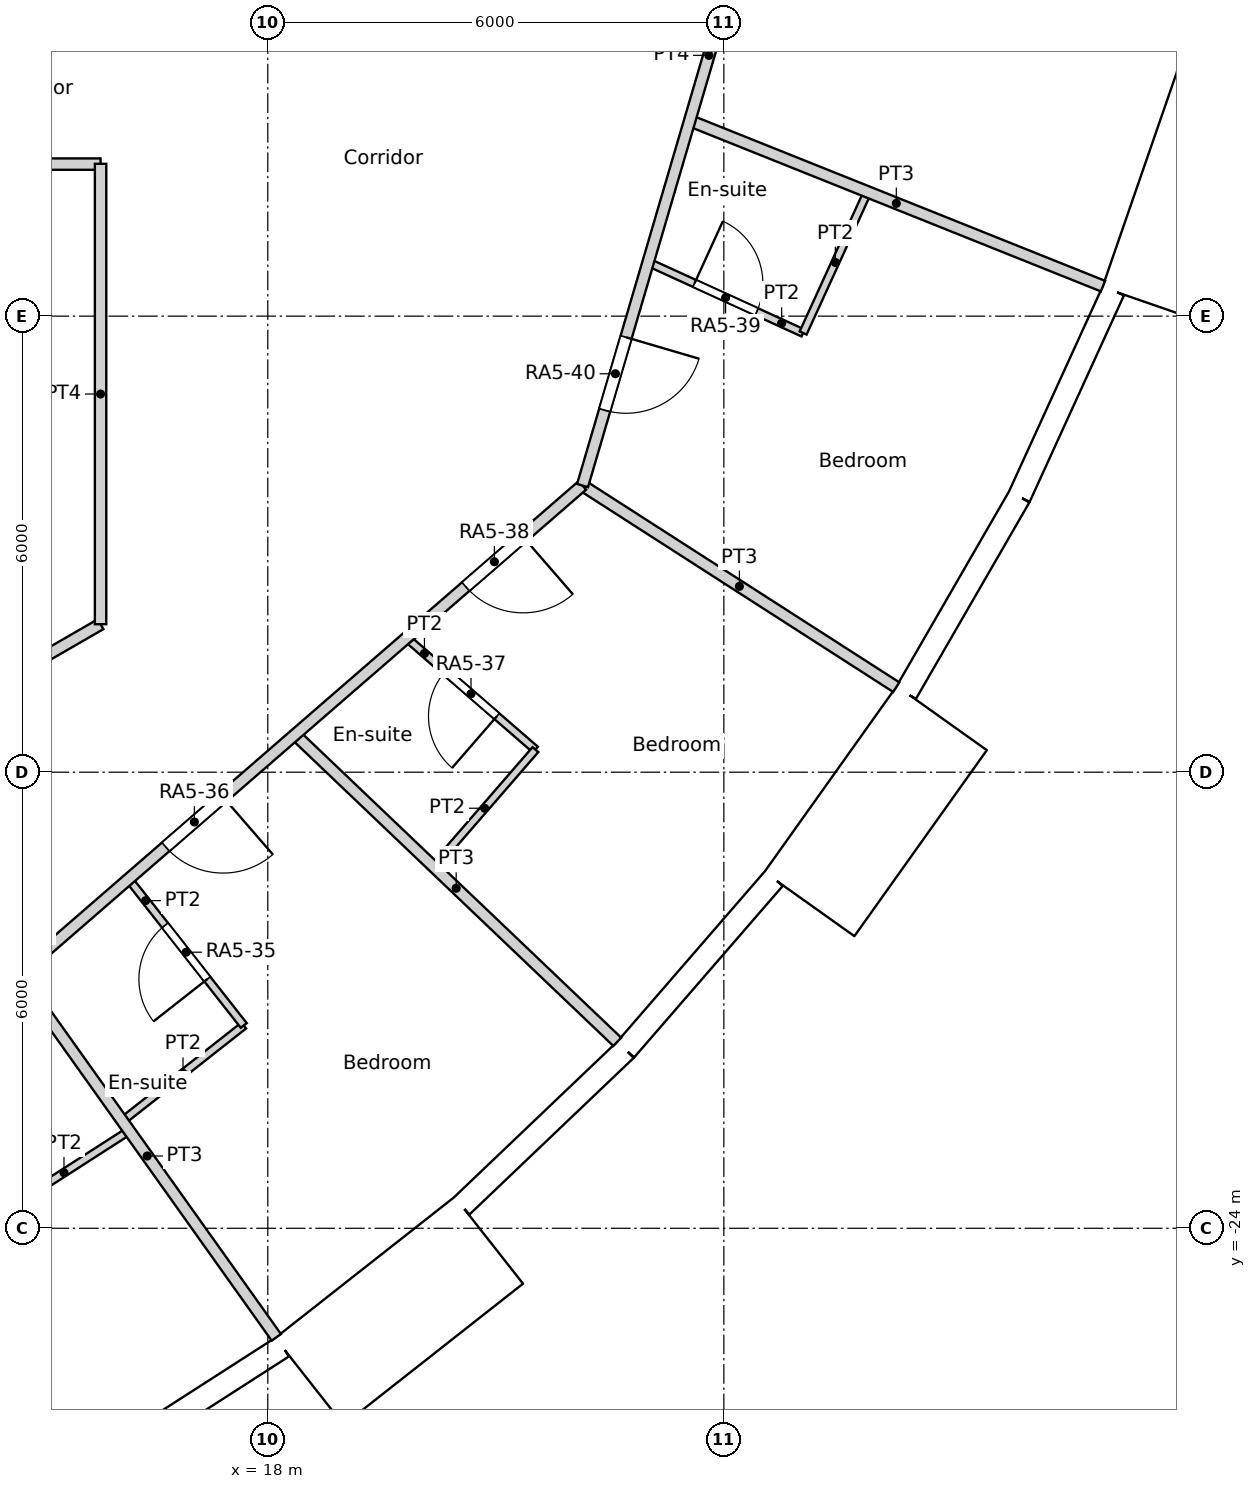
"""IFC4 building model, lengths in metres.
Left out: names, types, materials, properties, quantities, classifications, styles, units other than length and angle.
Written with IfcOpenShell. Run it as: python <this file> out.ifc"""

import sys

from ifc_helpers import new_model, si_unit, direction, frame, frame_2d, origin, origin_2d, place, context, subcontext, project, spatial, rectangle, circle, extrude, element, fill, save


model = new_model("IFC4")
c1 = context("Model", 3, precision=1e-05, world=origin(), true_north=direction((0.0, 1.0)))
c2 = subcontext(c1, "Body", "Model", "MODEL_VIEW")
j1 = project(units=[si_unit("LENGTHUNIT", "METRE"), si_unit("PLANEANGLEUNIT", "RADIAN")], contexts=[c1])
p1 = place(None, origin())
s1 = spatial("IfcSite", under=j1, at=p1, CompositionType="ELEMENT")
p2 = place(p1, origin())
s2 = spatial("IfcBuilding", under=s1, at=p2, CompositionType="ELEMENT")
p3 = place(p2, frame((0.0, 0.0, 71.4)))
s3 = spatial("IfcBuildingStorey", under=s2, at=p3, CompositionType="ELEMENT", Elevation=71.4)
for number, where, z_axis, x_axis in (
    (1, (17.561, -24.661, 0.0), (0.0, 0.0, 1.0), (1.0, 0.0, 0.0)),
    (2, (21.911, -20.892, 0.0), (0.0, 0.0, 1.0), (1.0, 0.0, 0.0)),
    (3, (25.469, -16.368, 0.0), (0.0, 0.0, 1.0), (1.0, 0.0, 0.0)),
    (4, (28.106, -11.252, 0.0), (0.0, 0.0, 1.0), (1.0, 0.0, 0.0)),
):
    element("IfcColumn", number, at=place(p3, frame(where, z_axis=z_axis, x_axis=x_axis)), inside=s3, PredefinedType="COLUMN", context=c2, shape_type="SweptSolid", body=[
        extrude(circle(Radius=0.6, at=origin_2d()), origin(), (0.0, 0.0, 1.0), 3.6),
    ])
for number, where, z_axis, x_axis in (
    (5, (14.659, -19.69, 0.0), (0.0, 0.0, 1.0), (1.0, 0.0, 0.0)),
    (6, (18.805, -15.779, 0.0), (0.0, 0.0, 1.0), (1.0, 0.0, 0.0)),
    (7, (21.937, -11.017, 0.0), (0.0, 0.0, 1.0), (1.0, 0.0, 0.0)),
):
    element("IfcColumn", number, at=place(p3, frame(where, z_axis=z_axis, x_axis=x_axis)), inside=s3, PredefinedType="COLUMN", context=c2, shape_type="SweptSolid", body=[
        extrude(circle(Radius=0.65, at=origin_2d()), origin(), (0.0, 0.0, 1.0), 3.6),
    ])
p4 = place(p3, frame((15.552, -10.603, 0.0), z_axis=(0.0, 0.0, 1.0), x_axis=(1.0, 0.0, 0.0)))
e8 = element("IfcColumn", 8, at=p4, inside=s3, PredefinedType="COLUMN", context=c2, shape_type="SweptSolid", body=[
    extrude(circle(Radius=0.7, at=origin_2d()), origin(), (0.0, 0.0, 1.0), 3.6),
])
p5 = place(p3, frame((15.687, -27.171, 0.0), z_axis=(0.0, 0.0, 1.0), x_axis=(0.84122372879, 0.540687190639, 0.0)))
e9 = element("IfcWall", 9, at=p5, inside=s3, PredefinedType="SOLIDWALL", context=c2, shape_type="SweptSolid", body=[
    extrude(rectangle(XDim=2.98, YDim=0.3, at=frame_2d((1.49, 0.0))), origin(), (0.0, 0.0, 1.0), 3.15),
])
p6 = place(p5, frame((1.49, 0.0, 1.55)))
e10 = element("IfcOpeningElement", 10, at=p6, cuts=e9, PredefinedType="OPENING", context=c2, shape_type="SweptSolid", body=[
    extrude(circle(Radius=0.9, at=origin_2d()), frame((0.0, 0.16, 0.0), z_axis=(0.0, -1.0, 0.0), x_axis=(1.0, 0.0, 0.0)), (0.0, 0.0, 1.0), 0.32),
])
p7 = place(p3, frame((18.549, -26.013, -0.45), z_axis=(0.0, 0.0, 1.0), x_axis=(0.786049992888, 0.618162930529, 0.0)))
e11 = element("IfcWall", 11, at=p7, inside=s3, PredefinedType="ELEMENTEDWALL", context=c2, shape_type="SweptSolid", body=[
    extrude(rectangle(XDim=3.0, YDim=1.45, at=frame_2d((1.5, 0.0))), origin(), (0.0, 0.0, 1.0), 3.6),
])
p8 = place(p7, frame((1.5, 0.0, 2.0)))
e12 = element("IfcOpeningElement", 12, at=p8, cuts=e11, PredefinedType="OPENING", context=c2, shape_type="SweptSolid", body=[
    extrude(circle(Radius=0.9, at=origin_2d()), frame((0.0, 0.735, 0.0), z_axis=(0.0, -1.0, 0.0), x_axis=(1.0, 0.0, 0.0)), (0.0, 0.0, 1.0), 1.47),
])
p9 = place(p3, frame((20.55, -23.707, 0.0), z_axis=(0.0, 0.0, 1.0), x_axis=(0.723744206617, 0.690068346896, 0.0)))
e13 = element("IfcWall", 13, at=p9, inside=s3, PredefinedType="SOLIDWALL", context=c2, shape_type="SweptSolid", body=[
    extrude(rectangle(XDim=2.98, YDim=0.3, at=frame_2d((1.49, 0.0))), origin(), (0.0, 0.0, 1.0), 3.15),
])
p10 = place(p9, frame((1.49, 0.0, 1.55)))
e14 = element("IfcOpeningElement", 14, at=p10, cuts=e13, PredefinedType="OPENING", context=c2, shape_type="SweptSolid", body=[
    extrude(circle(Radius=0.9, at=origin_2d()), frame((0.0, 0.16, 0.0), z_axis=(0.0, -1.0, 0.0), x_axis=(1.0, 0.0, 0.0)), (0.0, 0.0, 1.0), 0.32),
])
p11 = place(p3, frame((22.707, -21.651, 0.0), z_axis=(0.0, 0.0, 1.0), x_axis=(0.654830712471, 0.755775587066, 0.0)))
e15 = element("IfcWall", 15, at=p11, inside=s3, PredefinedType="SOLIDWALL", context=c2, shape_type="SweptSolid", body=[
    extrude(rectangle(XDim=2.98, YDim=0.3, at=frame_2d((1.49, 0.0))), origin(), (0.0, 0.0, 1.0), 3.15),
])
p12 = place(p11, frame((1.49, 0.0, 1.55)))
e16 = element("IfcOpeningElement", 16, at=p12, cuts=e15, PredefinedType="OPENING", context=c2, shape_type="SweptSolid", body=[
    extrude(circle(Radius=0.9, at=origin_2d()), frame((0.0, 0.16, 0.0), z_axis=(0.0, -1.0, 0.0), x_axis=(1.0, 0.0, 0.0)), (0.0, 0.0, 1.0), 0.32),
])
p13 = place(p3, frame((25.126, -19.734, -0.45), z_axis=(0.0, 0.0, 1.0), x_axis=(0.580090570606, 0.814551981088, 0.0)))
e17 = element("IfcWall", 17, at=p13, inside=s3, PredefinedType="ELEMENTEDWALL", context=c2, shape_type="SweptSolid", body=[
    extrude(rectangle(XDim=3.0, YDim=1.45, at=frame_2d((1.5, 0.0))), origin(), (0.0, 0.0, 1.0), 3.6),
])
p14 = place(p13, frame((1.5, 0.0, 2.0)))
e18 = element("IfcOpeningElement", 18, at=p14, cuts=e17, PredefinedType="OPENING", context=c2, shape_type="SweptSolid", body=[
    extrude(circle(Radius=0.9, at=origin_2d()), frame((0.0, 0.735, 0.0), z_axis=(0.0, -1.0, 0.0), x_axis=(1.0, 0.0, 0.0)), (0.0, 0.0, 1.0), 1.47),
])
p15 = place(p3, frame((26.397, -16.957, 0.0), z_axis=(0.0, 0.0, 1.0), x_axis=(0.499999078476, 0.866025935826, 0.0)))
e19 = element("IfcWall", 19, at=p15, inside=s3, PredefinedType="SOLIDWALL", context=c2, shape_type="SweptSolid", body=[
    extrude(rectangle(XDim=2.979, YDim=0.3, at=frame_2d((1.49, 0.0))), origin(), (0.0, 0.0, 1.0), 3.15),
])
p16 = place(p15, frame((1.49, 0.0, 1.55)))
e20 = element("IfcOpeningElement", 20, at=p16, cuts=e19, PredefinedType="OPENING", context=c2, shape_type="SweptSolid", body=[
    extrude(circle(Radius=0.9, at=origin_2d()), frame((0.0, 0.16, 0.0), z_axis=(0.0, -1.0, 0.0), x_axis=(1.0, 0.0, 0.0)), (0.0, 0.0, 1.0), 0.32),
])
p17 = place(p3, frame((27.887, -14.377, 0.0), z_axis=(0.0, 0.0, 1.0), x_axis=(0.415407317162, 0.909635509888, 0.0)))
e21 = element("IfcWall", 21, at=p17, inside=s3, PredefinedType="SOLIDWALL", context=c2, shape_type="SweptSolid", body=[
    extrude(rectangle(XDim=2.98, YDim=0.3, at=frame_2d((1.49, 0.0))), origin(), (0.0, 0.0, 1.0), 3.15),
])
p18 = place(p17, frame((1.49, 0.0, 1.55)))
e22 = element("IfcOpeningElement", 22, at=p18, cuts=e21, PredefinedType="OPENING", context=c2, shape_type="SweptSolid", body=[
    extrude(circle(Radius=0.9, at=origin_2d()), frame((0.0, 0.16, 0.0), z_axis=(0.0, -1.0, 0.0), x_axis=(1.0, 0.0, 0.0)), (0.0, 0.0, 1.0), 0.32),
])
p19 = place(p3, frame((29.668, -11.855, -0.45), z_axis=(0.0, 0.0, 1.0), x_axis=(0.327071431777, 0.944999618262, 0.0)))
e23 = element("IfcWall", 23, at=p19, inside=s3, PredefinedType="ELEMENTEDWALL", context=c2, shape_type="SweptSolid", body=[
    extrude(rectangle(XDim=3.0, YDim=1.45, at=frame_2d((1.5, 0.0))), origin(), (0.0, 0.0, 1.0), 3.6),
])
p20 = place(p19, frame((1.5, 0.0, 2.0)))
e24 = element("IfcOpeningElement", 24, at=p20, cuts=e23, PredefinedType="OPENING", context=c2, shape_type="SweptSolid", body=[
    extrude(circle(Radius=0.9, at=origin_2d()), frame((0.0, 0.735, 0.0), z_axis=(0.0, -1.0, 0.0), x_axis=(1.0, 0.0, 0.0)), (0.0, 0.0, 1.0), 1.47),
])
p21 = place(p3, frame((14.0, -10.0, 0.0), z_axis=(0.0, 0.0, 1.0), x_axis=(1.0, 0.0, 0.0)))
e25 = element("IfcWall", 25, at=p21, inside=s3, PredefinedType="PARTITIONING", context=c2, shape_type="SweptSolid", body=[
    extrude(rectangle(XDim=1.8, YDim=0.15, at=frame_2d((0.9, 0.0))), origin(), (0.0, 0.0, 1.0), 3.15),
])
p22 = place(p3, frame((15.8, -16.053, 0.0), z_axis=(0.0, 0.0, 1.0), x_axis=(0.0, 1.0, 0.0)))
e26 = element("IfcWall", 26, at=p22, inside=s3, PredefinedType="PARTITIONING", context=c2, shape_type="SweptSolid", body=[
    extrude(rectangle(XDim=6.057, YDim=0.15, at=frame_2d((3.028, 0.0))), origin(), (0.0, 0.0, 1.0), 3.15),
])
p23 = place(p3, frame((13.247, -21.939, 0.0), z_axis=(0.0, 0.0, 1.0), x_axis=(0.755420750547, 0.655240024451, 0.0)))
e27 = element("IfcWall", 27, at=p23, inside=s3, PredefinedType="PARTITIONING", context=c2, shape_type="SweptSolid", body=[
    extrude(rectangle(XDim=11.771, YDim=0.15, at=frame_2d((5.885, 0.0))), origin(), (0.0, 0.0, 1.0), 3.15),
])
p24 = place(p23, frame((4.513, 0.0, 0.0)))
e28 = element("IfcOpeningElement", 28, at=p24, cuts=e27, PredefinedType="OPENING", context=c2, shape_type="SweptSolid", body=[
    extrude(rectangle(XDim=1.0, YDim=2.1, at=frame_2d((0.5, 1.05))), frame((0.0, 0.075, 0.0), z_axis=(0.0, -1.0, 0.0), x_axis=(1.0, 0.0, 0.0)), (0.0, 0.0, 1.0), 0.15),
])
p25 = place(p23, frame((9.738, 0.0, 0.0)))
e29 = element("IfcOpeningElement", 29, at=p25, cuts=e27, PredefinedType="OPENING", context=c2, shape_type="SweptSolid", body=[
    extrude(rectangle(XDim=1.0, YDim=2.1, at=frame_2d((0.5, 1.05))), frame((0.0, 0.075, 0.0), z_axis=(0.0, -1.0, 0.0), x_axis=(1.0, 0.0, 0.0)), (0.0, 0.0, 1.0), 0.15),
])
p26 = place(p3, frame((22.141, -14.229, 0.0), z_axis=(0.0, 0.0, 1.0), x_axis=(0.281765208947, 0.959483385488, 0.0)))
e30 = element("IfcWall", 30, at=p26, inside=s3, PredefinedType="PARTITIONING", context=c2, shape_type="SweptSolid", body=[
    extrude(rectangle(XDim=14.83, YDim=0.15, at=frame_2d((7.415, 0.0))), origin(), (0.0, 0.0, 1.0), 3.15),
])
p27 = place(p26, frame((1.033, 0.0, 0.0)))
e31 = element("IfcOpeningElement", 31, at=p27, cuts=e30, PredefinedType="OPENING", context=c2, shape_type="SweptSolid", body=[
    extrude(rectangle(XDim=1.0, YDim=2.1, at=frame_2d((0.5, 1.05))), frame((0.0, 0.075, 0.0), z_axis=(0.0, -1.0, 0.0), x_axis=(1.0, 0.0, 0.0)), (0.0, 0.0, 1.0), 0.15),
])
p28 = place(p26, frame((9.765, 0.0, 0.0)))
e32 = element("IfcOpeningElement", 32, at=p28, cuts=e30, PredefinedType="OPENING", context=c2, shape_type="SweptSolid", body=[
    extrude(rectangle(XDim=1.8, YDim=2.1, at=frame_2d((0.9, 1.05))), frame((0.0, 0.075, 0.0), z_axis=(0.0, -1.0, 0.0), x_axis=(1.0, 0.0, 0.0)), (0.0, 0.0, 1.0), 0.15),
])
p29 = place(p3, frame((11.336, -18.63, 0.0), z_axis=(0.0, 0.0, 1.0), x_axis=(0.866063337164, 0.499934291702, 0.0)))
e33 = element("IfcWall", 33, at=p29, inside=s3, PredefinedType="PARTITIONING", context=c2, shape_type="SweptSolid", body=[
    extrude(rectangle(XDim=5.155, YDim=0.15, at=frame_2d((2.577, 0.0))), origin(), (0.0, 0.0, 1.0), 3.15),
])
p30 = place(p3, frame((14.46, -23.821, 0.0), z_axis=(0.0, 0.0, 1.0), x_axis=(0.841135728185, 0.540824081168, 0.0)))
e34 = element("IfcWall", 34, at=p30, inside=s3, PredefinedType="PARTITIONING", context=c2, shape_type="SweptSolid", body=[
    extrude(rectangle(XDim=2.041, YDim=0.1, at=frame_2d((1.021, 0.0))), origin(), (0.0, 0.0, 1.0), 3.15),
])
p31 = place(p3, frame((14.715, -20.664, 0.0), z_axis=(0.0, 0.0, 1.0), x_axis=(0.57995989616, -0.814645026282, 0.0)))
e35 = element("IfcWall", 35, at=p31, inside=s3, PredefinedType="PARTITIONING", context=c2, shape_type="SweptSolid", body=[
    extrude(rectangle(XDim=5.857, YDim=0.15, at=frame_2d((2.928, 0.0))), origin(), (0.0, 0.0, 1.0), 3.15),
])
p32 = place(p3, frame((16.086, -22.589, 0.0), z_axis=(0.0, 0.0, 1.0), x_axis=(0.785984904201, 0.618245687707, 0.0)))
e36 = element("IfcWall", 36, at=p32, inside=s3, PredefinedType="PARTITIONING", context=c2, shape_type="SweptSolid", body=[
    extrude(rectangle(XDim=2.033, YDim=0.1, at=frame_2d((1.017, 0.0))), origin(), (0.0, 0.0, 1.0), 3.15),
])
p33 = place(p3, frame((16.168, -19.404, 0.0), z_axis=(0.0, 0.0, 1.0), x_axis=(0.618142414415, -0.786066126672, 0.0)))
e37 = element("IfcWall", 37, at=p33, inside=s3, PredefinedType="PARTITIONING", context=c2, shape_type="SweptSolid", body=[
    extrude(rectangle(XDim=2.453, YDim=0.1, at=frame_2d((1.226, 0.0))), origin(), (0.0, 0.0, 1.0), 3.15),
])
p34 = place(p33, frame((0.777, 0.0, 0.0)))
e38 = element("IfcOpeningElement", 38, at=p34, cuts=e37, PredefinedType="OPENING", context=c2, shape_type="SweptSolid", body=[
    extrude(rectangle(XDim=0.9, YDim=2.04, at=frame_2d((0.45, 1.02))), frame((0.0, 0.05, 0.0), z_axis=(0.0, -1.0, 0.0), x_axis=(1.0, 0.0, 0.0)), (0.0, 0.0, 1.0), 0.1),
])
p35 = place(p3, frame((18.359, -17.506, 0.0), z_axis=(0.0, 0.0, 1.0), x_axis=(0.723808715798, -0.690000683286, 0.0)))
e39 = element("IfcWall", 39, at=p35, inside=s3, PredefinedType="PARTITIONING", context=c2, shape_type="SweptSolid", body=[
    extrude(rectangle(XDim=5.856, YDim=0.15, at=frame_2d((2.928, 0.0))), origin(), (0.0, 0.0, 1.0), 3.15),
])
p36 = place(p3, frame((20.184, -19.245, 0.0), z_axis=(0.0, 0.0, 1.0), x_axis=(0.655017058368, 0.755614090159, 0.0)))
e40 = element("IfcWall", 40, at=p36, inside=s3, PredefinedType="PARTITIONING", context=c2, shape_type="SweptSolid", body=[
    extrude(rectangle(XDim=2.041, YDim=0.1, at=frame_2d((1.021, 0.0))), origin(), (0.0, 0.0, 1.0), 3.15),
])
p37 = place(p3, frame((19.826, -16.234, 0.0), z_axis=(0.0, 0.0, 1.0), x_axis=(0.755703447798, -0.654913963042, 0.0)))
e41 = element("IfcWall", 41, at=p37, inside=s3, PredefinedType="PARTITIONING", context=c2, shape_type="SweptSolid", body=[
    extrude(rectangle(XDim=2.243, YDim=0.1, at=frame_2d((1.122, 0.0))), origin(), (0.0, 0.0, 1.0), 3.15),
])
p38 = place(p37, frame((0.672, 0.0, 0.0)))
e42 = element("IfcOpeningElement", 42, at=p38, cuts=e41, PredefinedType="OPENING", context=c2, shape_type="SweptSolid", body=[
    extrude(rectangle(XDim=0.9, YDim=2.04, at=frame_2d((0.45, 1.02))), frame((0.0, 0.05, 0.0), z_axis=(0.0, -1.0, 0.0), x_axis=(1.0, 0.0, 0.0)), (0.0, 0.0, 1.0), 0.1),
])
p39 = place(p3, frame((22.141, -14.229, 0.0), z_axis=(0.0, 0.0, 1.0), x_axis=(0.841265781699, -0.540621757371, 0.0)))
e43 = element("IfcWall", 43, at=p39, inside=s3, PredefinedType="PARTITIONING", context=c2, shape_type="SweptSolid", body=[
    extrude(rectangle(XDim=4.906, YDim=0.15, at=frame_2d((2.453, 0.0))), origin(), (0.0, 0.0, 1.0), 3.15),
])
p40 = place(p3, frame((23.003, -11.291, 0.0), z_axis=(0.0, 0.0, 1.0), x_axis=(0.90975773562, -0.41513956988, 0.0)))
e44 = element("IfcWall", 44, at=p40, inside=s3, PredefinedType="PARTITIONING", context=c2, shape_type="SweptSolid", body=[
    extrude(rectangle(XDim=2.242, YDim=0.1, at=frame_2d((1.121, 0.0))), origin(), (0.0, 0.0, 1.0), 3.15),
])
p41 = place(p40, frame((0.671, 0.0, 0.0)))
e45 = element("IfcOpeningElement", 45, at=p41, cuts=e44, PredefinedType="OPENING", context=c2, shape_type="SweptSolid", body=[
    extrude(rectangle(XDim=0.9, YDim=2.04, at=frame_2d((0.45, 1.02))), frame((0.0, 0.05, 0.0), z_axis=(0.0, -1.0, 0.0), x_axis=(1.0, 0.0, 0.0)), (0.0, 0.0, 1.0), 0.1),
])
p42 = place(p3, frame((25.043, -12.222, 0.0), z_axis=(0.0, 0.0, 1.0), x_axis=(0.41546015385, 0.909611378866, 0.0)))
e46 = element("IfcWall", 46, at=p42, inside=s3, PredefinedType="PARTITIONING", context=c2, shape_type="SweptSolid", body=[
    extrude(rectangle(XDim=2.042, YDim=0.1, at=frame_2d((1.021, 0.0))), origin(), (0.0, 0.0, 1.0), 3.15),
])
p43 = place(p3, frame((23.55, -9.428, 0.0), z_axis=(0.0, 0.0, 1.0), x_axis=(0.928355916729, -0.371692469489, 0.0)))
e47 = element("IfcWall", 47, at=p43, inside=s3, PredefinedType="PARTITIONING", context=c2, shape_type="SweptSolid", body=[
    extrude(rectangle(XDim=5.858, YDim=0.15, at=frame_2d((2.929, 0.0))), origin(), (0.0, 0.0, 1.0), 3.15),
])
p44 = place(p6, origin())
e48 = element("IfcWindow", 48, at=p44, inside=s3, PartitioningType="SINGLE_PANEL", PredefinedType="WINDOW", context=c2, shape_type="SweptSolid", body=[
    extrude(circle(Radius=0.9, at=origin_2d()), frame((0.0, 0.12, 0.0), z_axis=(0.0, -1.0, 0.0), x_axis=(1.0, 0.0, 0.0)), (0.0, 0.0, 1.0), 0.1),
])
fill(e10, e48)
p45 = place(p8, origin())
e49 = element("IfcWindow", 49, at=p45, inside=s3, PartitioningType="SINGLE_PANEL", PredefinedType="WINDOW", context=c2, shape_type="SweptSolid", body=[
    extrude(circle(Radius=0.9, at=origin_2d()), frame((0.0, 0.695, 0.0), z_axis=(0.0, -1.0, 0.0), x_axis=(1.0, 0.0, 0.0)), (0.0, 0.0, 1.0), 0.1),
])
fill(e12, e49)
p46 = place(p10, origin())
e50 = element("IfcWindow", 50, at=p46, inside=s3, PartitioningType="SINGLE_PANEL", PredefinedType="WINDOW", context=c2, shape_type="SweptSolid", body=[
    extrude(circle(Radius=0.9, at=origin_2d()), frame((0.0, 0.12, 0.0), z_axis=(0.0, -1.0, 0.0), x_axis=(1.0, 0.0, 0.0)), (0.0, 0.0, 1.0), 0.1),
])
fill(e14, e50)
p47 = place(p12, origin())
e51 = element("IfcWindow", 51, at=p47, inside=s3, PartitioningType="SINGLE_PANEL", PredefinedType="WINDOW", context=c2, shape_type="SweptSolid", body=[
    extrude(circle(Radius=0.9, at=origin_2d()), frame((0.0, 0.12, 0.0), z_axis=(0.0, -1.0, 0.0), x_axis=(1.0, 0.0, 0.0)), (0.0, 0.0, 1.0), 0.1),
])
fill(e16, e51)
p48 = place(p14, origin())
e52 = element("IfcWindow", 52, at=p48, inside=s3, PartitioningType="SINGLE_PANEL", PredefinedType="WINDOW", context=c2, shape_type="SweptSolid", body=[
    extrude(circle(Radius=0.9, at=origin_2d()), frame((0.0, 0.695, 0.0), z_axis=(0.0, -1.0, 0.0), x_axis=(1.0, 0.0, 0.0)), (0.0, 0.0, 1.0), 0.1),
])
fill(e18, e52)
p49 = place(p16, origin())
e53 = element("IfcWindow", 53, at=p49, inside=s3, PartitioningType="SINGLE_PANEL", PredefinedType="WINDOW", context=c2, shape_type="SweptSolid", body=[
    extrude(circle(Radius=0.9, at=origin_2d()), frame((0.0, 0.12, 0.0), z_axis=(0.0, -1.0, 0.0), x_axis=(1.0, 0.0, 0.0)), (0.0, 0.0, 1.0), 0.1),
])
fill(e20, e53)
p50 = place(p18, origin())
e54 = element("IfcWindow", 54, at=p50, inside=s3, PartitioningType="SINGLE_PANEL", PredefinedType="WINDOW", context=c2, shape_type="SweptSolid", body=[
    extrude(circle(Radius=0.9, at=origin_2d()), frame((0.0, 0.12, 0.0), z_axis=(0.0, -1.0, 0.0), x_axis=(1.0, 0.0, 0.0)), (0.0, 0.0, 1.0), 0.1),
])
fill(e22, e54)
p51 = place(p20, origin())
e55 = element("IfcWindow", 55, at=p51, inside=s3, PartitioningType="SINGLE_PANEL", PredefinedType="WINDOW", context=c2, shape_type="SweptSolid", body=[
    extrude(circle(Radius=0.9, at=origin_2d()), frame((0.0, 0.695, 0.0), z_axis=(0.0, -1.0, 0.0), x_axis=(1.0, 0.0, 0.0)), (0.0, 0.0, 1.0), 0.1),
])
fill(e24, e55)
p52 = place(p34, origin())
e56 = element("IfcDoor", 56, at=p52, inside=s3, OperationType="SINGLE_SWING_LEFT", PredefinedType="DOOR", context=c2, shape_type="SweptSolid", body=[
    extrude(rectangle(XDim=0.9, YDim=2.04, at=frame_2d((0.45, 1.02))), frame((0.0, 0.025, 0.0), z_axis=(0.0, -1.0, 0.0), x_axis=(1.0, 0.0, 0.0)), (0.0, 0.0, 1.0), 0.05),
])
fill(e38, e56)
p53 = place(p24, origin())
e57 = element("IfcDoor", 57, at=p53, inside=s3, OperationType="SINGLE_SWING_LEFT", PredefinedType="DOOR", context=c2, shape_type="SweptSolid", body=[
    extrude(rectangle(XDim=1.0, YDim=2.1, at=frame_2d((0.5, 1.05))), frame((0.0, 0.025, 0.0), z_axis=(0.0, -1.0, 0.0), x_axis=(1.0, 0.0, 0.0)), (0.0, 0.0, 1.0), 0.05),
])
fill(e28, e57)
p54 = place(p38, origin())
e58 = element("IfcDoor", 58, at=p54, inside=s3, OperationType="SINGLE_SWING_LEFT", PredefinedType="DOOR", context=c2, shape_type="SweptSolid", body=[
    extrude(rectangle(XDim=0.9, YDim=2.04, at=frame_2d((0.45, 1.02))), frame((0.0, 0.025, 0.0), z_axis=(0.0, -1.0, 0.0), x_axis=(1.0, 0.0, 0.0)), (0.0, 0.0, 1.0), 0.05),
])
fill(e42, e58)
p55 = place(p25, origin())
e59 = element("IfcDoor", 59, at=p55, inside=s3, OperationType="SINGLE_SWING_LEFT", PredefinedType="DOOR", context=c2, shape_type="SweptSolid", body=[
    extrude(rectangle(XDim=1.0, YDim=2.1, at=frame_2d((0.5, 1.05))), frame((0.0, 0.025, 0.0), z_axis=(0.0, -1.0, 0.0), x_axis=(1.0, 0.0, 0.0)), (0.0, 0.0, 1.0), 0.05),
])
fill(e29, e59)
p56 = place(p41, origin())
e60 = element("IfcDoor", 60, at=p56, inside=s3, OperationType="SINGLE_SWING_LEFT", PredefinedType="DOOR", context=c2, shape_type="SweptSolid", body=[
    extrude(rectangle(XDim=0.9, YDim=2.04, at=frame_2d((0.45, 1.02))), frame((0.0, 0.025, 0.0), z_axis=(0.0, -1.0, 0.0), x_axis=(1.0, 0.0, 0.0)), (0.0, 0.0, 1.0), 0.05),
])
fill(e45, e60)
p57 = place(p27, origin())
e61 = element("IfcDoor", 61, at=p57, inside=s3, OperationType="SINGLE_SWING_LEFT", PredefinedType="DOOR", context=c2, shape_type="SweptSolid", body=[
    extrude(rectangle(XDim=1.0, YDim=2.1, at=frame_2d((0.5, 1.05))), frame((0.0, 0.025, 0.0), z_axis=(0.0, -1.0, 0.0), x_axis=(1.0, 0.0, 0.0)), (0.0, 0.0, 1.0), 0.05),
])
fill(e31, e61)
save(model, sys.argv[1])
